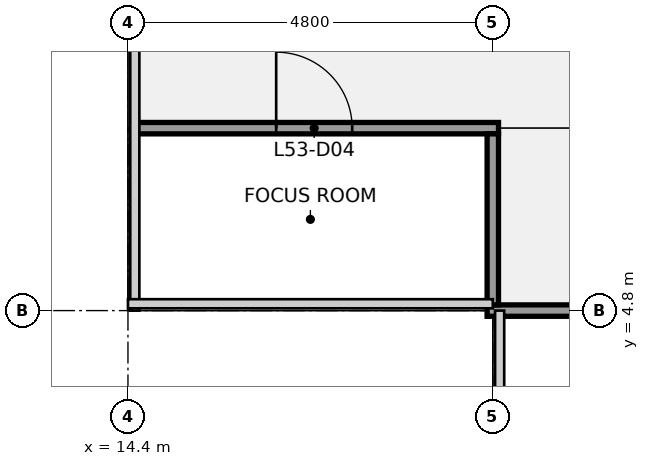
"""IFC4 building model, lengths in metres.
Left out: names, types, materials, properties, quantities, classifications, styles, units other than length and angle.
Written with IfcOpenShell. Run it as: python <this file> out.ifc"""

import sys

from ifc_helpers import new_model, si_unit, direction, frame, frame_2d, origin, place, context, subcontext, project, spatial, rectangle, extrude, element, fill, save


model = new_model("IFC4")
c1 = context("Model", 3, precision=1e-05, world=origin(), true_north=direction((0.0, 1.0)))
c2 = subcontext(c1, "Body", "Model", "MODEL_VIEW")
j1 = project(units=[si_unit("LENGTHUNIT", "METRE"), si_unit("PLANEANGLEUNIT", "RADIAN")], contexts=[c1])
p1 = place(None, origin())
s1 = spatial("IfcSite", under=j1, at=p1, CompositionType="ELEMENT")
p2 = place(p1, origin())
s2 = spatial("IfcBuilding", under=s1, at=p2, CompositionType="ELEMENT")
p3 = place(p2, frame((0.0, 0.0, 241.2)))
s3 = spatial("IfcBuildingStorey", under=s2, at=p3, CompositionType="ELEMENT", Elevation=241.2)
p4 = place(p3, frame((19.125, 4.8, 0.0), z_axis=(0.0, 0.0, 1.0), x_axis=(1.0, 0.0, 0.0)))
e1 = element("IfcWall", 1, at=p4, inside=s3, PredefinedType="PARTITIONING", context=c2, shape_type="SweptSolid", body=[
    extrude(rectangle(XDim=19.35, YDim=0.15, at=frame_2d((9.675, 0.0))), origin(), (0.0, 0.0, 1.0), 2.849),
])
p5 = place(p4, frame((4.375, 0.0, 0.0)))
e2 = element("IfcOpeningElement", 2, at=p5, cuts=e1, PredefinedType="OPENING", context=c2, shape_type="SweptSolid", body=[
    extrude(rectangle(XDim=1.0, YDim=2.1, at=frame_2d((0.5, 1.05))), frame((0.0, 0.085, 0.0), z_axis=(0.0, -1.0, 0.0), x_axis=(1.0, 0.0, 0.0)), (0.0, 0.0, 1.0), 0.17),
])
p6 = place(p4, frame((10.375, 0.0, 0.0)))
e3 = element("IfcOpeningElement", 3, at=p6, cuts=e1, PredefinedType="OPENING", context=c2, shape_type="SweptSolid", body=[
    extrude(rectangle(XDim=1.0, YDim=2.1, at=frame_2d((0.5, 1.05))), frame((0.0, 0.085, 0.0), z_axis=(0.0, -1.0, 0.0), x_axis=(1.0, 0.0, 0.0)), (0.0, 0.0, 1.0), 0.17),
])
p7 = place(p4, frame((15.175, 0.0, 0.0)))
e4 = element("IfcOpeningElement", 4, at=p7, cuts=e1, PredefinedType="OPENING", context=c2, shape_type="SweptSolid", body=[
    extrude(rectangle(XDim=1.0, YDim=2.1, at=frame_2d((0.5, 1.05))), frame((0.0, 0.085, 0.0), z_axis=(0.0, -1.0, 0.0), x_axis=(1.0, 0.0, 0.0)), (0.0, 0.0, 1.0), 0.17),
])
p8 = place(p3, frame((14.5, 7.2, 0.0), z_axis=(0.0, 0.0, 1.0), x_axis=(1.0, 0.0, 0.0)))
e5 = element("IfcWall", 5, at=p8, inside=s3, PredefinedType="PARTITIONING", context=c2, shape_type="SweptSolid", body=[
    extrude(rectangle(XDim=4.775, YDim=0.15, at=frame_2d((2.387, 0.0))), origin(), (0.0, 0.0, 1.0), 2.849),
])
p9 = place(p8, frame((1.85, 0.0, 0.0)))
e6 = element("IfcOpeningElement", 6, at=p9, cuts=e5, PredefinedType="OPENING", context=c2, shape_type="SweptSolid", body=[
    extrude(rectangle(XDim=1.0, YDim=2.1, at=frame_2d((0.5, 1.05))), frame((0.0, 0.085, 0.0), z_axis=(0.0, -1.0, 0.0), x_axis=(1.0, 0.0, 0.0)), (0.0, 0.0, 1.0), 0.17),
])
p10 = place(p3, frame((19.2, 4.875, 0.0), z_axis=(0.0, 0.0, 1.0), x_axis=(0.0, 1.0, 0.0)))
e7 = element("IfcWall", 7, at=p10, inside=s3, PredefinedType="PARTITIONING", context=c2, shape_type="SweptSolid", body=[
    extrude(rectangle(XDim=2.25, YDim=0.15, at=frame_2d((1.125, 0.0))), origin(), (0.0, 0.0, 1.0), 2.849),
])
p11 = place(p9, origin())
e8 = element("IfcDoor", 8, at=p11, inside=s3, OperationType="SINGLE_SWING_LEFT", PredefinedType="DOOR", context=c2, shape_type="SweptSolid", body=[
    extrude(rectangle(XDim=1.0, YDim=2.1, at=frame_2d((0.5, 1.05))), frame((0.0, 0.025, 0.0), z_axis=(0.0, -1.0, 0.0), x_axis=(1.0, 0.0, 0.0)), (0.0, 0.0, 1.0), 0.05),
])
fill(e6, e8)
save(model, sys.argv[1])
